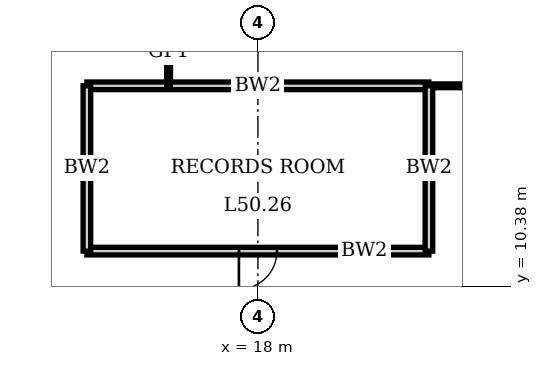
"""IFC4 building model, lengths in metres.
Left out: names, types, materials, properties, quantities, classifications, styles, units other than length and angle.
Written with IfcOpenShell. Run it as: python <this file> out.ifc"""

import sys

from ifc_helpers import new_model, si_unit, direction, frame, frame_2d, origin, place, context, subcontext, project, spatial, rectangle, extrude, element, fill, save


model = new_model("IFC4")
c1 = context("Model", 3, precision=1e-05, world=origin(), true_north=direction((0.0, 1.0)))
c2 = subcontext(c1, "Body", "Model", "MODEL_VIEW")
j1 = project(units=[si_unit("LENGTHUNIT", "METRE"), si_unit("PLANEANGLEUNIT", "RADIAN")], contexts=[c1])
p1 = place(None, origin())
s1 = spatial("IfcSite", under=j1, at=p1, CompositionType="ELEMENT")
p2 = place(p1, origin())
s2 = spatial("IfcBuilding", under=s1, at=p2, CompositionType="ELEMENT")
p3 = place(p2, frame((0.0, 0.0, 206.2)))
s3 = spatial("IfcBuildingStorey", under=s2, at=p3, CompositionType="ELEMENT", Elevation=206.2)
p4 = place(p3, frame((13.5, 11.3, 0.0), z_axis=(0.0, 0.0, 1.0), x_axis=(1.0, 0.0, 0.0)))
e1 = element("IfcWall", 1, at=p4, inside=s3, PredefinedType="SOLIDWALL", context=c2, shape_type="SweptSolid", body=[
    extrude(rectangle(XDim=9.0, YDim=0.2, at=frame_2d((4.5, 0.0))), origin(), (0.0, 0.0, 1.0), 3.75),
])
p5 = place(p4, frame((4.0, 0.0, 0.0)))
e2 = element("IfcOpeningElement", 2, at=p5, cuts=e1, PredefinedType="OPENING", context=c2, shape_type="SweptSolid", body=[
    extrude(rectangle(XDim=1.0, YDim=2.4, at=frame_2d((0.5, 1.2))), frame((0.0, 0.11, 0.0), z_axis=(0.0, -1.0, 0.0), x_axis=(1.0, 0.0, 0.0)), (0.0, 0.0, 1.0), 0.22),
])
p6 = place(p3, frame((13.5, 15.65, 0.0), z_axis=(0.0, 0.0, 1.0), x_axis=(1.0, 0.0, 0.0)))
e3 = element("IfcWall", 3, at=p6, inside=s3, PredefinedType="SOLIDWALL", context=c2, shape_type="SweptSolid", body=[
    extrude(rectangle(XDim=9.0, YDim=0.2, at=frame_2d((4.5, 0.0))), origin(), (0.0, 0.0, 1.0), 3.75),
])
p7 = place(p3, frame((22.5, 15.65, 0.0), z_axis=(0.0, 0.0, 1.0), x_axis=(1.0, 0.0, 0.0)))
e4 = element("IfcWall", 4, at=p7, inside=s3, PredefinedType="PARTITIONING", context=c2, shape_type="SweptSolid", body=[
    extrude(rectangle(XDim=24.85, YDim=0.1, at=frame_2d((12.425, 0.0))), origin(), (0.0, 0.0, 1.0), 3.75),
])
p8 = place(p7, frame((11.925, 0.0, 0.0)))
e5 = element("IfcOpeningElement", 5, at=p8, cuts=e4, PredefinedType="OPENING", context=c2, shape_type="SweptSolid", body=[
    extrude(rectangle(XDim=1.0, YDim=2.4, at=frame_2d((0.5, 1.2))), frame((0.0, 0.06, 0.0), z_axis=(0.0, -1.0, 0.0), x_axis=(1.0, 0.0, 0.0)), (0.0, 0.0, 1.0), 0.12),
])
p9 = place(p3, frame((13.5, 11.3, 0.0), z_axis=(0.0, 0.0, 1.0), x_axis=(0.0, 1.0, 0.0)))
e6 = element("IfcWall", 6, at=p9, inside=s3, PredefinedType="SOLIDWALL", context=c2, shape_type="SweptSolid", body=[
    extrude(rectangle(XDim=4.35, YDim=0.2, at=frame_2d((2.175, 0.0))), origin(), (0.0, 0.0, 1.0), 3.75),
])
p10 = place(p3, frame((15.65, 15.65, 0.0), z_axis=(0.0, 0.0, 1.0), x_axis=(0.0, 1.0, 0.0)))
e7 = element("IfcWall", 7, at=p10, inside=s3, PredefinedType="PARTITIONING", context=c2, shape_type="SweptSolid", body=[
    extrude(rectangle(XDim=1.8, YDim=0.1, at=frame_2d((0.9, 0.0))), origin(), (0.0, 0.0, 1.0), 3.75),
])
p11 = place(p3, frame((22.5, 11.3, 0.0), z_axis=(0.0, 0.0, 1.0), x_axis=(0.0, 1.0, 0.0)))
e8 = element("IfcWall", 8, at=p11, inside=s3, PredefinedType="SOLIDWALL", context=c2, shape_type="SweptSolid", body=[
    extrude(rectangle(XDim=4.35, YDim=0.2, at=frame_2d((2.175, 0.0))), origin(), (0.0, 0.0, 1.0), 3.75),
])
p12 = place(p5, origin())
e9 = element("IfcDoor", 9, at=p12, inside=s3, OperationType="SINGLE_SWING_LEFT", PredefinedType="DOOR", context=c2, shape_type="SweptSolid", body=[
    extrude(rectangle(XDim=1.0, YDim=2.4, at=frame_2d((0.5, 1.2))), frame((0.0, 0.035, 0.0), z_axis=(0.0, -1.0, 0.0), x_axis=(1.0, 0.0, 0.0)), (0.0, 0.0, 1.0), 0.07),
])
fill(e2, e9)
save(model, sys.argv[1])
